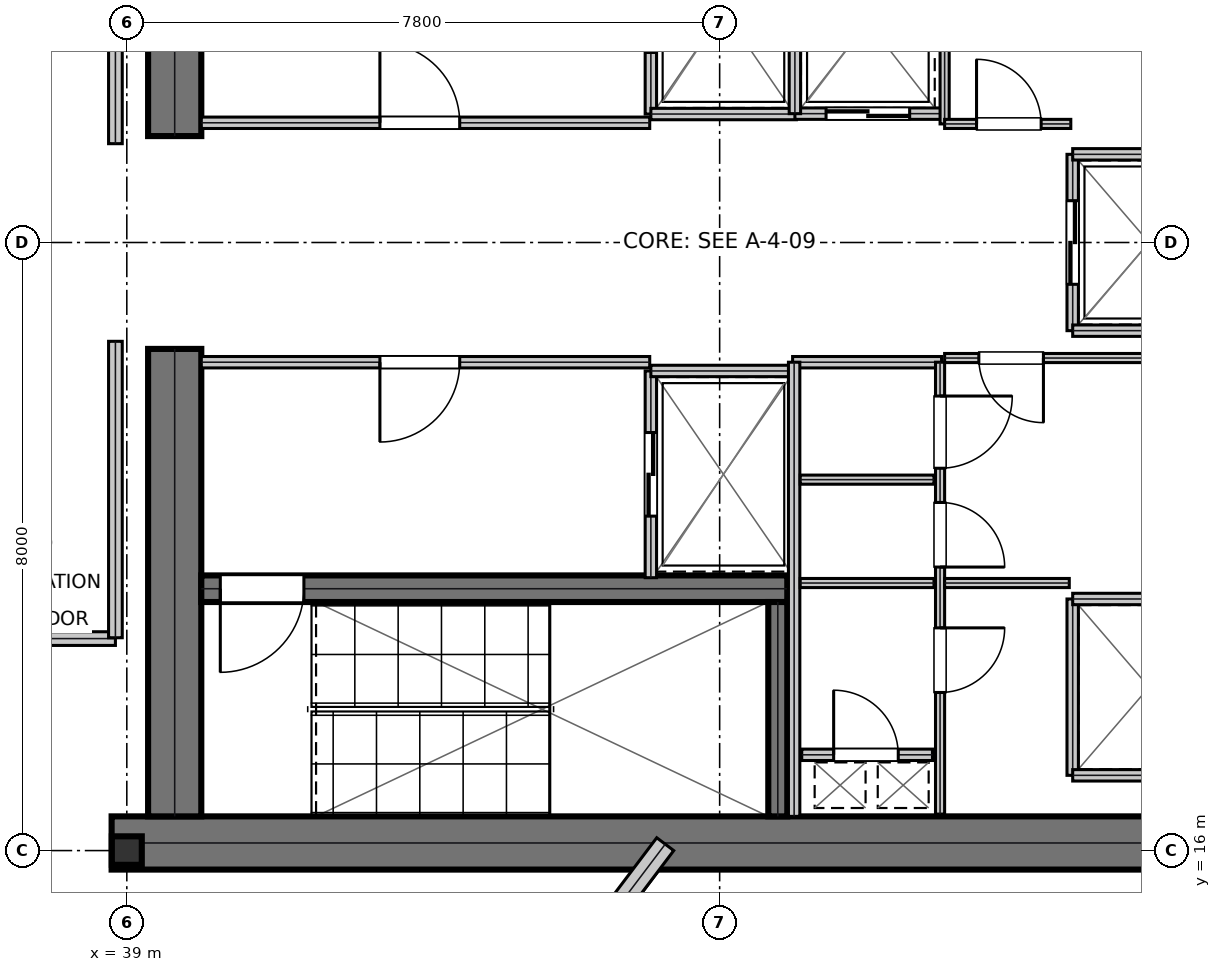
"""IFC4 building model, lengths in metres.
Left out: names, types, materials, properties, quantities, classifications, styles, units other than length and angle.
Written with IfcOpenShell. Run it as: python <this file> out.ifc"""

import sys

from ifc_helpers import new_model, si_unit, direction, frame, frame_2d, origin, origin_2d, place, context, subcontext, project, spatial, rectangle, i_section, extrude, element, fill, save


model = new_model("IFC4")
c1 = context("Model", 3, precision=1e-05, world=origin(), true_north=direction((0.0, 1.0)))
c2 = subcontext(c1, "Body", "Model", "MODEL_VIEW")
j1 = project(units=[si_unit("LENGTHUNIT", "METRE"), si_unit("PLANEANGLEUNIT", "RADIAN")], contexts=[c1])
p1 = place(None, origin())
s1 = spatial("IfcSite", under=j1, at=p1, CompositionType="ELEMENT")
p2 = place(p1, origin())
s2 = spatial("IfcBuilding", under=s1, at=p2, CompositionType="ELEMENT")
p3 = place(p2, frame((0.0, 0.0, 240.45)))
s3 = spatial("IfcBuildingStorey", under=s2, at=p3, CompositionType="ELEMENT", Elevation=240.45)
p4 = place(p3, frame((38.8, 16.1, 0.0), z_axis=(0.0, 0.0, 1.0), x_axis=(1.0, 0.0, 0.0)))
e1 = element("IfcWall", 1, at=p4, inside=s3, PredefinedType="SHEAR", context=c2, shape_type="SweptSolid", body=[
    extrude(rectangle(XDim=16.0, YDim=0.7, at=frame_2d((8.0, 0.0))), origin(), (0.0, 0.0, 1.0), 3.79),
])
for number, where, z_axis, x_axis in (
    (2, (39.63, 16.45, 0.0), (0.0, 0.0, 1.0), (0.0, 1.0, 0.0)),
    (3, (39.63, 25.4, 0.0), (0.0, 0.0, 1.0), (0.0, 1.0, 0.0)),
):
    element("IfcWall", number, at=place(p3, frame(where, z_axis=z_axis, x_axis=x_axis)), inside=s3, PredefinedType="SHEAR", context=c2, shape_type="SweptSolid", body=[
        extrude(rectangle(XDim=6.15, YDim=0.7, at=frame_2d((3.075, 0.0))), origin(), (0.0, 0.0, 1.0), 3.79),
    ])
p5 = place(p3, frame((39.98, 19.445, 0.0), z_axis=(0.0, 0.0, 1.0), x_axis=(1.0, 0.0, 0.0)))
e4 = element("IfcWall", 4, at=p5, inside=s3, PredefinedType="SHEAR", context=c2, shape_type="SweptSolid", body=[
    extrude(rectangle(XDim=7.71, YDim=0.35, at=frame_2d((3.855, 0.0))), origin(), (0.0, 0.0, 1.0), 3.79),
])
p6 = place(p5, frame((0.25, 0.0, 0.0)))
e5 = element("IfcOpeningElement", 5, at=p6, cuts=e4, PredefinedType="OPENING", context=c2, shape_type="SweptSolid", body=[
    extrude(rectangle(XDim=1.1, YDim=2.15, at=frame_2d((0.55, 1.075))), frame((0.0, 0.185, 0.0), z_axis=(0.0, -1.0, 0.0), x_axis=(1.0, 0.0, 0.0)), (0.0, 0.0, 1.0), 0.37),
])
p7 = place(p3, frame((47.565, 16.45, 0.0), z_axis=(0.0, 0.0, 1.0), x_axis=(0.0, 1.0, 0.0)))
e6 = element("IfcWall", 6, at=p7, inside=s3, PredefinedType="SHEAR", context=c2, shape_type="SweptSolid", body=[
    extrude(rectangle(XDim=2.82, YDim=0.25, at=frame_2d((1.41, 0.0))), origin(), (0.0, 0.0, 1.0), 3.79),
])
p8 = place(p3, frame((39.0, 16.0, 0.0), z_axis=(0.0, 0.0, 1.0), x_axis=(1.0, 0.0, 0.0)))
e7 = element("IfcColumn", 7, at=p8, inside=s3, PredefinedType="COLUMN", context=c2, shape_type="SweptSolid", body=[
    extrude(i_section(OverallWidth=0.394, OverallDepth=0.375, WebThickness=0.017, FlangeThickness=0.028, at=origin_2d()), origin(), (0.0, 0.0, 1.0), 4.044),
])
p9 = place(p3, frame((43.961, 13.273, 0.0), z_axis=(0.0, 0.0, 1.0), x_axis=(0.602635996318, 0.7980162003, 0.0)))
e8 = element("IfcWall", 8, at=p9, inside=s3, PredefinedType="STANDARD", context=c2, shape_type="SweptSolid", body=[
    extrude(rectangle(XDim=3.522, YDim=0.28, at=frame_2d((1.761, 0.0))), origin(), (0.0, 0.0, 1.0), 3.319),
])
p10 = place(p3, frame((39.98, 25.575, 0.0), z_axis=(0.0, 0.0, 1.0), x_axis=(1.0, 0.0, 0.0)))
e9 = element("IfcWall", 9, at=p10, inside=s3, PredefinedType="PARTITIONING", context=c2, shape_type="SweptSolid", body=[
    extrude(rectangle(XDim=5.9, YDim=0.15, at=frame_2d((2.95, 0.0))), origin(), (0.0, 0.0, 1.0), 3.79),
])
p11 = place(p10, frame((2.35, 0.0, 0.0)))
e10 = element("IfcOpeningElement", 10, at=p11, cuts=e9, PredefinedType="OPENING", context=c2, shape_type="SweptSolid", body=[
    extrude(rectangle(XDim=1.05, YDim=2.15, at=frame_2d((0.525, 1.075))), frame((0.0, 0.085, 0.0), z_axis=(0.0, -1.0, 0.0), x_axis=(1.0, 0.0, 0.0)), (0.0, 0.0, 1.0), 0.17),
])
p12 = place(p3, frame((39.98, 22.425, 0.0), z_axis=(0.0, 0.0, 1.0), x_axis=(1.0, 0.0, 0.0)))
e11 = element("IfcWall", 11, at=p12, inside=s3, PredefinedType="PARTITIONING", context=c2, shape_type="SweptSolid", body=[
    extrude(rectangle(XDim=5.9, YDim=0.15, at=frame_2d((2.95, 0.0))), origin(), (0.0, 0.0, 1.0), 3.79),
])
p13 = place(p12, frame((2.35, 0.0, 0.0)))
e12 = element("IfcOpeningElement", 12, at=p13, cuts=e11, PredefinedType="OPENING", context=c2, shape_type="SweptSolid", body=[
    extrude(rectangle(XDim=1.05, YDim=2.15, at=frame_2d((0.525, 1.075))), frame((0.0, 0.085, 0.0), z_axis=(0.0, -1.0, 0.0), x_axis=(1.0, 0.0, 0.0)), (0.0, 0.0, 1.0), 0.17),
])
p14 = place(p3, frame((45.895, 25.69, 0.0), z_axis=(0.0, 0.0, 1.0), x_axis=(0.0, 1.0, 0.0)))
e13 = element("IfcWall", 13, at=p14, inside=s3, PredefinedType="PARTITIONING", context=c2, shape_type="SweptSolid", body=[
    extrude(rectangle(XDim=2.72, YDim=0.15, at=frame_2d((1.36, 0.0))), origin(), (0.0, 0.0, 1.0), 3.79),
])
p15 = place(p14, frame((0.81, 0.0, 0.0)))
e14 = element("IfcOpeningElement", 14, at=p15, cuts=e13, PredefinedType="OPENING", context=c2, shape_type="SweptSolid", body=[
    extrude(rectangle(XDim=1.1, YDim=2.15, at=frame_2d((0.55, 1.075))), frame((0.0, 0.085, 0.0), z_axis=(0.0, -1.0, 0.0), x_axis=(1.0, 0.0, 0.0)), (0.0, 0.0, 1.0), 0.17),
])
p16 = place(p3, frame((45.895, 25.69, 0.0), z_axis=(0.0, 0.0, 1.0), x_axis=(1.0, 0.0, 0.0)))
e15 = element("IfcWall", 15, at=p16, inside=s3, PredefinedType="PARTITIONING", context=c2, shape_type="SweptSolid", body=[
    extrude(rectangle(XDim=1.915, YDim=0.15, at=frame_2d((0.958, 0.0))), origin(), (0.0, 0.0, 1.0), 3.79),
])
p17 = place(p3, frame((45.895, 19.59, 0.0), z_axis=(0.0, 0.0, 1.0), x_axis=(0.0, 1.0, 0.0)))
e16 = element("IfcWall", 16, at=p17, inside=s3, PredefinedType="PARTITIONING", context=c2, shape_type="SweptSolid", body=[
    extrude(rectangle(XDim=2.72, YDim=0.15, at=frame_2d((1.36, 0.0))), origin(), (0.0, 0.0, 1.0), 3.79),
])
p18 = place(p17, frame((0.81, 0.0, 0.0)))
e17 = element("IfcOpeningElement", 17, at=p18, cuts=e16, PredefinedType="OPENING", context=c2, shape_type="SweptSolid", body=[
    extrude(rectangle(XDim=1.1, YDim=2.15, at=frame_2d((0.55, 1.075))), frame((0.0, 0.085, 0.0), z_axis=(0.0, -1.0, 0.0), x_axis=(1.0, 0.0, 0.0)), (0.0, 0.0, 1.0), 0.17),
])
p19 = place(p3, frame((45.895, 22.31, 0.0), z_axis=(0.0, 0.0, 1.0), x_axis=(1.0, 0.0, 0.0)))
e18 = element("IfcWall", 18, at=p19, inside=s3, PredefinedType="PARTITIONING", context=c2, shape_type="SweptSolid", body=[
    extrude(rectangle(XDim=1.915, YDim=0.15, at=frame_2d((0.958, 0.0))), origin(), (0.0, 0.0, 1.0), 3.79),
])
p20 = place(p3, frame((47.79, 25.695, 0.0), z_axis=(0.0, 0.0, 1.0), x_axis=(1.0, 0.0, 0.0)))
e19 = element("IfcWall", 19, at=p20, inside=s3, PredefinedType="PARTITIONING", context=c2, shape_type="SweptSolid", body=[
    extrude(rectangle(XDim=1.92, YDim=0.15, at=frame_2d((0.96, 0.0))), origin(), (0.0, 0.0, 1.0), 3.79),
])
p21 = place(p20, frame((0.41, 0.0, 0.0)))
e20 = element("IfcOpeningElement", 20, at=p21, cuts=e19, PredefinedType="OPENING", context=c2, shape_type="SweptSolid", body=[
    extrude(rectangle(XDim=1.1, YDim=2.15, at=frame_2d((0.55, 1.075))), frame((0.0, 0.085, 0.0), z_axis=(0.0, -1.0, 0.0), x_axis=(1.0, 0.0, 0.0)), (0.0, 0.0, 1.0), 0.17),
])
p22 = place(p3, frame((47.79, 25.695, 0.0), z_axis=(0.0, 0.0, 1.0), x_axis=(0.0, 1.0, 0.0)))
e21 = element("IfcWall", 21, at=p22, inside=s3, PredefinedType="PARTITIONING", context=c2, shape_type="SweptSolid", body=[
    extrude(rectangle(XDim=2.415, YDim=0.15, at=frame_2d((1.208, 0.0))), origin(), (0.0, 0.0, 1.0), 3.79),
])
p23 = place(p3, frame((51.445, 22.84, 0.0), z_axis=(0.0, 0.0, 1.0), x_axis=(0.0, 1.0, 0.0)))
e22 = element("IfcWall", 22, at=p23, inside=s3, PredefinedType="PARTITIONING", context=c2, shape_type="SweptSolid", body=[
    extrude(rectangle(XDim=2.32, YDim=0.15, at=frame_2d((1.16, 0.0))), origin(), (0.0, 0.0, 1.0), 3.79),
])
p24 = place(p23, frame((0.61, 0.0, 0.0)))
e23 = element("IfcOpeningElement", 23, at=p24, cuts=e22, PredefinedType="OPENING", context=c2, shape_type="SweptSolid", body=[
    extrude(rectangle(XDim=1.1, YDim=2.15, at=frame_2d((0.55, 1.075))), frame((0.0, 0.085, 0.0), z_axis=(0.0, -1.0, 0.0), x_axis=(1.0, 0.0, 0.0)), (0.0, 0.0, 1.0), 0.17),
])
for number, where, z_axis, x_axis in (
    (24, (51.445, 22.84, 0.0), (0.0, 0.0, 1.0), (1.0, 0.0, 0.0)),
    (25, (51.445, 25.16, 0.0), (0.0, 0.0, 1.0), (1.0, 0.0, 0.0)),
):
    element("IfcWall", number, at=place(p3, frame(where, z_axis=z_axis, x_axis=x_axis)), inside=s3, PredefinedType="PARTITIONING", context=c2, shape_type="SweptSolid", body=[
        extrude(rectangle(XDim=2.015, YDim=0.15, at=frame_2d((1.007, 0.0))), origin(), (0.0, 0.0, 1.0), 3.79),
    ])
p25 = place(p3, frame((51.445, 16.99, 0.0), z_axis=(0.0, 0.0, 1.0), x_axis=(0.0, 1.0, 0.0)))
e26 = element("IfcWall", 26, at=p25, inside=s3, PredefinedType="PARTITIONING", context=c2, shape_type="SweptSolid", body=[
    extrude(rectangle(XDim=2.32, YDim=0.15, at=frame_2d((1.16, 0.0))), origin(), (0.0, 0.0, 1.0), 3.79),
])
for number, where, z_axis, x_axis in (
    (27, (51.445, 16.99, 0.0), (0.0, 0.0, 1.0), (1.0, 0.0, 0.0)),
    (28, (51.445, 19.31, 0.0), (0.0, 0.0, 1.0), (1.0, 0.0, 0.0)),
):
    element("IfcWall", number, at=place(p3, frame(where, z_axis=z_axis, x_axis=x_axis)), inside=s3, PredefinedType="PARTITIONING", context=c2, shape_type="SweptSolid", body=[
        extrude(rectangle(XDim=2.015, YDim=0.15, at=frame_2d((1.007, 0.0))), origin(), (0.0, 0.0, 1.0), 3.79),
    ])
p26 = place(p3, frame((47.88, 17.26, 0.0), z_axis=(0.0, 0.0, 1.0), x_axis=(1.0, 0.0, 0.0)))
e29 = element("IfcWall", 29, at=p26, inside=s3, PredefinedType="PARTITIONING", context=c2, shape_type="SweptSolid", body=[
    extrude(rectangle(XDim=1.72, YDim=0.15, at=frame_2d((0.86, 0.0))), origin(), (0.0, 0.0, 1.0), 3.79),
])
p27 = place(p26, frame((0.42, 0.0, 0.0)))
e30 = element("IfcOpeningElement", 30, at=p27, cuts=e29, PredefinedType="OPENING", context=c2, shape_type="SweptSolid", body=[
    extrude(rectangle(XDim=0.85, YDim=2.15, at=frame_2d((0.425, 1.075))), frame((0.0, 0.085, 0.0), z_axis=(0.0, -1.0, 0.0), x_axis=(1.0, 0.0, 0.0)), (0.0, 0.0, 1.0), 0.17),
])
p28 = place(p3, frame((47.76, 22.425, 0.0), z_axis=(0.0, 0.0, 1.0), x_axis=(1.0, 0.0, 0.0)))
e31 = element("IfcWall", 31, at=p28, inside=s3, PredefinedType="PARTITIONING", context=c2, shape_type="SweptSolid", body=[
    extrude(rectangle(XDim=1.96, YDim=0.15, at=frame_2d((0.98, 0.0))), origin(), (0.0, 0.0, 1.0), 3.79),
])
p29 = place(p3, frame((47.78, 16.45, 0.0), z_axis=(0.0, 0.0, 1.0), x_axis=(0.0, 1.0, 0.0)))
e32 = element("IfcWall", 32, at=p29, inside=s3, PredefinedType="PARTITIONING", context=c2, shape_type="SweptSolid", body=[
    extrude(rectangle(XDim=5.975, YDim=0.15, at=frame_2d((2.988, 0.0))), origin(), (0.0, 0.0, 1.0), 3.79),
])
for number, where, z_axis, x_axis in (
    (33, (47.86, 19.52, 0.0), (0.0, 0.0, 1.0), (1.0, 0.0, 0.0)),
    (34, (47.86, 20.88, 0.0), (0.0, 0.0, 1.0), (1.0, 0.0, 0.0)),
):
    element("IfcWall", number, at=place(p3, frame(where, z_axis=z_axis, x_axis=x_axis)), inside=s3, PredefinedType="PARTITIONING", context=c2, shape_type="SweptSolid", body=[
        extrude(rectangle(XDim=1.76, YDim=0.12, at=frame_2d((0.88, 0.0))), origin(), (0.0, 0.0, 1.0), 3.79),
    ])
p30 = place(p3, frame((49.7, 16.48, 0.0), z_axis=(0.0, 0.0, 1.0), x_axis=(0.0, 1.0, 0.0)))
e35 = element("IfcWall", 35, at=p30, inside=s3, PredefinedType="PARTITIONING", context=c2, shape_type="SweptSolid", body=[
    extrude(rectangle(XDim=5.945, YDim=0.12, at=frame_2d((2.973, 0.0))), origin(), (0.0, 0.0, 1.0), 3.79),
])
p31 = place(p30, frame((1.6, 0.0, 0.0)))
e36 = element("IfcOpeningElement", 36, at=p31, cuts=e35, PredefinedType="OPENING", context=c2, shape_type="SweptSolid", body=[
    extrude(rectangle(XDim=0.85, YDim=2.15, at=frame_2d((0.425, 1.075))), frame((0.0, 0.07, 0.0), z_axis=(0.0, -1.0, 0.0), x_axis=(1.0, 0.0, 0.0)), (0.0, 0.0, 1.0), 0.14),
])
p32 = place(p30, frame((3.25, 0.0, 0.0)))
e37 = element("IfcOpeningElement", 37, at=p32, cuts=e35, PredefinedType="OPENING", context=c2, shape_type="SweptSolid", body=[
    extrude(rectangle(XDim=0.85, YDim=2.15, at=frame_2d((0.425, 1.075))), frame((0.0, 0.07, 0.0), z_axis=(0.0, -1.0, 0.0), x_axis=(1.0, 0.0, 0.0)), (0.0, 0.0, 1.0), 0.14),
])
p33 = place(p30, frame((4.55, 0.0, 0.0)))
e38 = element("IfcOpeningElement", 38, at=p33, cuts=e35, PredefinedType="OPENING", context=c2, shape_type="SweptSolid", body=[
    extrude(rectangle(XDim=0.95, YDim=2.15, at=frame_2d((0.475, 1.075))), frame((0.0, 0.07, 0.0), z_axis=(0.0, -1.0, 0.0), x_axis=(1.0, 0.0, 0.0)), (0.0, 0.0, 1.0), 0.14),
])
p34 = place(p3, frame((49.76, 22.48, 0.0), z_axis=(0.0, 0.0, 1.0), x_axis=(1.0, 0.0, 0.0)))
e39 = element("IfcWall", 39, at=p34, inside=s3, PredefinedType="PARTITIONING", context=c2, shape_type="SweptSolid", body=[
    extrude(rectangle(XDim=3.9, YDim=0.12, at=frame_2d((1.95, 0.0))), origin(), (0.0, 0.0, 1.0), 3.79),
])
p35 = place(p34, frame((0.45, 0.0, 0.0)))
e40 = element("IfcOpeningElement", 40, at=p35, cuts=e39, PredefinedType="OPENING", context=c2, shape_type="SweptSolid", body=[
    extrude(rectangle(XDim=0.85, YDim=2.15, at=frame_2d((0.425, 1.075))), frame((0.0, 0.07, 0.0), z_axis=(0.0, -1.0, 0.0), x_axis=(1.0, 0.0, 0.0)), (0.0, 0.0, 1.0), 0.14),
])
p36 = place(p3, frame((49.76, 19.52, 0.0), z_axis=(0.0, 0.0, 1.0), x_axis=(1.0, 0.0, 0.0)))
e41 = element("IfcWall", 41, at=p36, inside=s3, PredefinedType="PARTITIONING", context=c2, shape_type="SweptSolid", body=[
    extrude(rectangle(XDim=1.64, YDim=0.12, at=frame_2d((0.82, 0.0))), origin(), (0.0, 0.0, 1.0), 3.79),
])
p37 = place(p3, frame((49.76, 25.56, 0.0), z_axis=(0.0, 0.0, 1.0), x_axis=(0.0, 1.0, 0.0)))
e42 = element("IfcWall", 42, at=p37, inside=s3, PredefinedType="PARTITIONING", context=c2, shape_type="SweptSolid", body=[
    extrude(rectangle(XDim=2.66, YDim=0.12, at=frame_2d((1.33, 0.0))), origin(), (0.0, 0.0, 1.0), 3.79),
])
p38 = place(p3, frame((49.76, 25.56, 0.0), z_axis=(0.0, 0.0, 1.0), x_axis=(1.0, 0.0, 0.0)))
e43 = element("IfcWall", 43, at=p38, inside=s3, PredefinedType="PARTITIONING", context=c2, shape_type="SweptSolid", body=[
    extrude(rectangle(XDim=1.66, YDim=0.12, at=frame_2d((0.83, 0.0))), origin(), (0.0, 0.0, 1.0), 3.79),
])
p39 = place(p38, frame((0.42, 0.0, 0.0)))
e44 = element("IfcOpeningElement", 44, at=p39, cuts=e43, PredefinedType="OPENING", context=c2, shape_type="SweptSolid", body=[
    extrude(rectangle(XDim=0.85, YDim=2.15, at=frame_2d((0.425, 1.075))), frame((0.0, 0.07, 0.0), z_axis=(0.0, -1.0, 0.0), x_axis=(1.0, 0.0, 0.0)), (0.0, 0.0, 1.0), 0.14),
])
p40 = place(p3, frame((26.888, 18.789, 0.0), z_axis=(0.0, 0.0, 1.0), x_axis=(1.0, 0.0, 0.0)))
e45 = element("IfcWall", 45, at=p40, inside=s3, PredefinedType="SOLIDWALL", context=c2, shape_type="SweptSolid", body=[
    extrude(rectangle(XDim=11.962, YDim=0.18, at=frame_2d((5.981, 0.0))), origin(), (0.0, 0.0, 1.0), 3.241),
])
p41 = place(p40, frame((5.481, 0.0, 0.0)))
e46 = element("IfcOpeningElement", 46, at=p41, cuts=e45, PredefinedType="OPENING", context=c2, shape_type="SweptSolid", body=[
    extrude(rectangle(XDim=1.0, YDim=2.15, at=frame_2d((0.5, 1.075))), frame((0.0, 0.1, 0.0), z_axis=(0.0, -1.0, 0.0), x_axis=(1.0, 0.0, 0.0)), (0.0, 0.0, 1.0), 0.2),
])
p42 = place(p3, frame((38.85, 18.8, 0.0), z_axis=(0.0, 0.0, 1.0), x_axis=(0.0, 1.0, 0.0)))
e47 = element("IfcWall", 47, at=p42, inside=s3, PredefinedType="SOLIDWALL", context=c2, shape_type="SweptSolid", body=[
    extrude(rectangle(XDim=3.9, YDim=0.18, at=frame_2d((1.95, 0.0))), origin(), (0.0, 0.0, 1.0), 3.468),
])
p43 = place(p3, frame((38.85, 25.3, 0.0), z_axis=(0.0, 0.0, 1.0), x_axis=(0.0, 1.0, 0.0)))
e48 = element("IfcWall", 48, at=p43, inside=s3, PredefinedType="SOLIDWALL", context=c2, shape_type="SweptSolid", body=[
    extrude(rectangle(XDim=8.2, YDim=0.18, at=frame_2d((4.1, 0.0))), origin(), (0.0, 0.0, 1.0), 3.241),
])
p44 = place(p11, origin())
e49 = element("IfcDoor", 49, at=p44, inside=s3, OperationType="SINGLE_SWING_LEFT", PredefinedType="DOOR", context=c2, shape_type="SweptSolid", body=[
    extrude(rectangle(XDim=1.05, YDim=2.15, at=frame_2d((0.525, 1.075))), frame((0.0, 0.025, 0.0), z_axis=(0.0, -1.0, 0.0), x_axis=(1.0, 0.0, 0.0)), (0.0, 0.0, 1.0), 0.05),
])
fill(e10, e49)
p45 = place(p13, frame((1.05, 0.0, 0.0), z_axis=(0.0, 0.0, 1.0), x_axis=(-1.0, 0.0, 0.0)))
e50 = element("IfcDoor", 50, at=p45, inside=s3, OperationType="SINGLE_SWING_RIGHT", PredefinedType="DOOR", context=c2, shape_type="SweptSolid", body=[
    extrude(rectangle(XDim=1.05, YDim=2.15, at=frame_2d((0.525, 1.075))), frame((0.0, 0.025, 0.0), z_axis=(0.0, -1.0, 0.0), x_axis=(1.0, 0.0, 0.0)), (0.0, 0.0, 1.0), 0.05),
])
fill(e12, e50)
p46 = place(p18, frame((1.1, 0.0, 0.0), z_axis=(0.0, 0.0, 1.0), x_axis=(-1.0, 0.0, 0.0)))
e51 = element("IfcDoor", 51, at=p46, inside=s3, OperationType="DOUBLE_DOOR_SLIDING", PredefinedType="DOOR", context=c2, shape_type="SweptSolid", body=[
    extrude(rectangle(XDim=1.1, YDim=2.15, at=frame_2d((0.55, 1.075))), frame((0.0, 0.025, 0.0), z_axis=(0.0, -1.0, 0.0), x_axis=(1.0, 0.0, 0.0)), (0.0, 0.0, 1.0), 0.05),
])
fill(e17, e51)
p47 = place(p21, frame((1.1, 0.0, 0.0), z_axis=(0.0, 0.0, 1.0), x_axis=(-1.0, 0.0, 0.0)))
e52 = element("IfcDoor", 52, at=p47, inside=s3, OperationType="DOUBLE_DOOR_SLIDING", PredefinedType="DOOR", context=c2, shape_type="SweptSolid", body=[
    extrude(rectangle(XDim=1.1, YDim=2.15, at=frame_2d((0.55, 1.075))), frame((0.0, 0.025, 0.0), z_axis=(0.0, -1.0, 0.0), x_axis=(1.0, 0.0, 0.0)), (0.0, 0.0, 1.0), 0.05),
])
fill(e20, e52)
p48 = place(p24, frame((1.1, 0.0, 0.0), z_axis=(0.0, 0.0, 1.0), x_axis=(-1.0, 0.0, 0.0)))
e53 = element("IfcDoor", 53, at=p48, inside=s3, OperationType="DOUBLE_DOOR_SLIDING", PredefinedType="DOOR", context=c2, shape_type="SweptSolid", body=[
    extrude(rectangle(XDim=1.1, YDim=2.15, at=frame_2d((0.55, 1.075))), frame((0.0, 0.025, 0.0), z_axis=(0.0, -1.0, 0.0), x_axis=(1.0, 0.0, 0.0)), (0.0, 0.0, 1.0), 0.05),
])
fill(e23, e53)
p49 = place(p27, origin())
e54 = element("IfcDoor", 54, at=p49, inside=s3, OperationType="SINGLE_SWING_LEFT", PredefinedType="TRAPDOOR", context=c2, shape_type="SweptSolid", body=[
    extrude(rectangle(XDim=0.85, YDim=2.15, at=frame_2d((0.425, 1.075))), frame((0.0, 0.025, 0.0), z_axis=(0.0, -1.0, 0.0), x_axis=(1.0, 0.0, 0.0)), (0.0, 0.0, 1.0), 0.05),
])
fill(e30, e54)
p50 = place(p31, frame((0.85, 0.0, 0.0), z_axis=(0.0, 0.0, 1.0), x_axis=(-1.0, 0.0, 0.0)))
e55 = element("IfcDoor", 55, at=p50, inside=s3, OperationType="SINGLE_SWING_LEFT", PredefinedType="DOOR", context=c2, shape_type="SweptSolid", body=[
    extrude(rectangle(XDim=0.85, YDim=2.15, at=frame_2d((0.425, 1.075))), frame((0.0, 0.025, 0.0), z_axis=(0.0, -1.0, 0.0), x_axis=(1.0, 0.0, 0.0)), (0.0, 0.0, 1.0), 0.05),
])
fill(e36, e55)
p51 = place(p32, frame((0.85, 0.0, 0.0), z_axis=(0.0, 0.0, 1.0), x_axis=(-1.0, 0.0, 0.0)))
e56 = element("IfcDoor", 56, at=p51, inside=s3, OperationType="SINGLE_SWING_RIGHT", PredefinedType="DOOR", context=c2, shape_type="SweptSolid", body=[
    extrude(rectangle(XDim=0.85, YDim=2.15, at=frame_2d((0.425, 1.075))), frame((0.0, 0.025, 0.0), z_axis=(0.0, -1.0, 0.0), x_axis=(1.0, 0.0, 0.0)), (0.0, 0.0, 1.0), 0.05),
])
fill(e37, e56)
p52 = place(p33, frame((0.95, 0.0, 0.0), z_axis=(0.0, 0.0, 1.0), x_axis=(-1.0, 0.0, 0.0)))
e57 = element("IfcDoor", 57, at=p52, inside=s3, OperationType="SINGLE_SWING_LEFT", PredefinedType="DOOR", context=c2, shape_type="SweptSolid", body=[
    extrude(rectangle(XDim=0.95, YDim=2.15, at=frame_2d((0.475, 1.075))), frame((0.0, 0.025, 0.0), z_axis=(0.0, -1.0, 0.0), x_axis=(1.0, 0.0, 0.0)), (0.0, 0.0, 1.0), 0.05),
])
fill(e38, e57)
p53 = place(p35, frame((0.85, 0.0, 0.0), z_axis=(0.0, 0.0, 1.0), x_axis=(-1.0, 0.0, 0.0)))
e58 = element("IfcDoor", 58, at=p53, inside=s3, OperationType="SINGLE_SWING_LEFT", PredefinedType="DOOR", context=c2, shape_type="SweptSolid", body=[
    extrude(rectangle(XDim=0.85, YDim=2.15, at=frame_2d((0.425, 1.075))), frame((0.0, 0.025, 0.0), z_axis=(0.0, -1.0, 0.0), x_axis=(1.0, 0.0, 0.0)), (0.0, 0.0, 1.0), 0.05),
])
fill(e40, e58)
p54 = place(p39, origin())
e59 = element("IfcDoor", 59, at=p54, inside=s3, OperationType="SINGLE_SWING_LEFT", PredefinedType="DOOR", context=c2, shape_type="SweptSolid", body=[
    extrude(rectangle(XDim=0.85, YDim=2.15, at=frame_2d((0.425, 1.075))), frame((0.0, 0.025, 0.0), z_axis=(0.0, -1.0, 0.0), x_axis=(1.0, 0.0, 0.0)), (0.0, 0.0, 1.0), 0.05),
])
fill(e44, e59)
p55 = place(p6, frame((1.1, 0.0, 0.0), z_axis=(0.0, 0.0, 1.0), x_axis=(-1.0, 0.0, 0.0)))
e60 = element("IfcDoor", 60, at=p55, inside=s3, OperationType="SINGLE_SWING_RIGHT", PredefinedType="DOOR", context=c2, shape_type="SweptSolid", body=[
    extrude(rectangle(XDim=1.1, YDim=2.15, at=frame_2d((0.55, 1.075))), frame((0.0, 0.025, 0.0), z_axis=(0.0, -1.0, 0.0), x_axis=(1.0, 0.0, 0.0)), (0.0, 0.0, 1.0), 0.05),
])
fill(e5, e60)
save(model, sys.argv[1])
